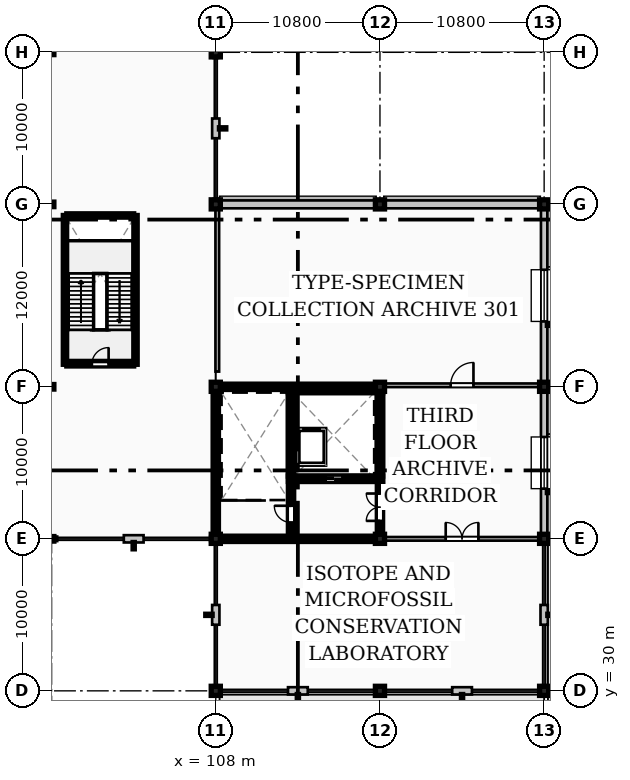
"""IFC4 building model, lengths in metres.
Left out: names, types, materials, properties, quantities, classifications, styles, units other than length and angle.
Written with IfcOpenShell. Run it as: python <this file> out.ifc"""

import sys

from ifc_helpers import new_model, si_unit, direction, frame, frame_2d, origin, origin_2d, place, context, subcontext, project, spatial, rectangle, hollow_rectangle, extrude, element, fill, save


model = new_model("IFC4")
c1 = context("Model", 3, precision=1e-05, world=origin(), true_north=direction((0.0, 1.0)))
c2 = subcontext(c1, "Body", "Model", "MODEL_VIEW")
j1 = project(units=[si_unit("LENGTHUNIT", "METRE"), si_unit("PLANEANGLEUNIT", "RADIAN")], contexts=[c1])
p1 = place(None, origin())
s1 = spatial("IfcSite", under=j1, at=p1, CompositionType="ELEMENT")
p2 = place(p1, origin())
s2 = spatial("IfcBuilding", under=s1, at=p2, CompositionType="ELEMENT")
p3 = place(p2, frame((0.0, 0.0, 14.4)))
s3 = spatial("IfcBuildingStorey", under=s2, at=p3, CompositionType="ELEMENT", Elevation=14.4)
for number, where, z_axis, x_axis in (
    (1, (97.2, 40.0, 0.0), (0.0, 0.0, 1.0), (1.0, 0.0, 0.0)),
    (2, (97.2, 50.0, 0.0), (0.0, 0.0, 1.0), (1.0, 0.0, 0.0)),
    (3, (97.2, 62.0, 0.0), (0.0, 0.0, 1.0), (1.0, 0.0, 0.0)),
    (4, (97.2, 72.0, 0.0), (0.0, 0.0, 1.0), (1.0, 0.0, 0.0)),
):
    element("IfcColumn", number, at=place(p3, frame(where, z_axis=z_axis, x_axis=x_axis)), inside=s3, PredefinedType="COLUMN", context=c2, shape_type="SweptSolid", body=[
        extrude(hollow_rectangle(XDim=0.3, YDim=0.3, WallThickness=0.016, InnerFilletRadius=0.016, OuterFilletRadius=0.032, at=origin_2d()), origin(), (0.0, 0.0, 1.0), 9.6),
    ])
for number, where, z_axis, x_axis in (
    (5, (108.0, 30.0, 0.0), (0.0, 0.0, 1.0), (1.0, 0.0, 0.0)),
    (6, (108.0, 40.0, 0.0), (0.0, 0.0, 1.0), (1.0, 0.0, 0.0)),
    (7, (108.0, 50.0, 0.0), (0.0, 0.0, 1.0), (1.0, 0.0, 0.0)),
    (8, (108.0, 62.0, 0.0), (0.0, 0.0, 1.0), (1.0, 0.0, 0.0)),
    (9, (108.0, 72.0, 0.0), (0.0, 0.0, 1.0), (1.0, 0.0, 0.0)),
    (10, (118.8, 30.0, 0.0), (0.0, 0.0, 1.0), (1.0, 0.0, 0.0)),
    (11, (118.8, 40.0, 0.0), (0.0, 0.0, 1.0), (1.0, 0.0, 0.0)),
    (12, (118.8, 50.0, 0.0), (0.0, 0.0, 1.0), (1.0, 0.0, 0.0)),
    (13, (118.8, 62.0, 0.0), (0.0, 0.0, 1.0), (1.0, 0.0, 0.0)),
    (14, (129.6, 30.0, 0.0), (0.0, 0.0, 1.0), (1.0, 0.0, 0.0)),
    (15, (129.6, 40.0, 0.0), (0.0, 0.0, 1.0), (1.0, 0.0, 0.0)),
    (16, (129.6, 50.0, 0.0), (0.0, 0.0, 1.0), (1.0, 0.0, 0.0)),
    (17, (129.6, 62.0, 0.0), (0.0, 0.0, 1.0), (1.0, 0.0, 0.0)),
):
    element("IfcColumn", number, at=place(p3, frame(where, z_axis=z_axis, x_axis=x_axis)), inside=s3, PredefinedType="COLUMN", context=c2, shape_type="SweptSolid", body=[
        extrude(rectangle(XDim=0.6, YDim=0.6, at=origin_2d()), origin(), (0.0, 0.0, 1.0), 9.6),
    ])
p4 = place(p3, frame((108.0, 35.65, 0.0), z_axis=(0.0, 0.0, 1.0), x_axis=(0.0, -1.0, 0.0)))
e18 = element("IfcWall", 18, at=p4, inside=s3, PredefinedType="STANDARD", context=c2, shape_type="SweptSolid", body=[
    extrude(rectangle(XDim=1.3, YDim=0.48, at=frame_2d((0.65, 0.0))), origin(), (0.0, 0.0, 1.0), 8.929),
])
for number, where, z_axis, x_axis in (
    (19, (108.0, 39.855, 0.0), (0.0, 0.0, 1.0), (0.0, -1.0, 0.0)),
    (20, (108.0, 30.37, 0.0), (0.0, 0.0, 1.0), (0.0, -1.0, 0.0)),
):
    element("IfcWall", number, at=place(p3, frame(where, z_axis=z_axis, x_axis=x_axis)), inside=s3, PredefinedType="STANDARD", context=c2, shape_type="SweptSolid", body=[
        extrude(rectangle(XDim=0.225, YDim=0.3, at=frame_2d((0.113, 0.0))), origin(), (0.0, 0.0, 1.0), 9.36),
    ])
p5 = place(p3, frame((112.75, 30.0, 0.0), z_axis=(0.0, 0.0, 1.0), x_axis=(1.0, 0.0, 0.0)))
e21 = element("IfcWall", 21, at=p5, inside=s3, PredefinedType="STANDARD", context=c2, shape_type="SweptSolid", body=[
    extrude(rectangle(XDim=1.3, YDim=0.48, at=frame_2d((0.65, 0.0))), origin(), (0.0, 0.0, 1.0), 8.929),
])
for number, where, z_axis, x_axis in (
    (22, (108.145, 30.0, 0.0), (0.0, 0.0, 1.0), (1.0, 0.0, 0.0)),
    (23, (118.43, 30.0, 0.0), (0.0, 0.0, 1.0), (1.0, 0.0, 0.0)),
):
    element("IfcWall", number, at=place(p3, frame(where, z_axis=z_axis, x_axis=x_axis)), inside=s3, PredefinedType="STANDARD", context=c2, shape_type="SweptSolid", body=[
        extrude(rectangle(XDim=0.225, YDim=0.3, at=frame_2d((0.113, 0.0))), origin(), (0.0, 0.0, 1.0), 9.36),
    ])
p6 = place(p3, frame((123.55, 30.0, 0.0), z_axis=(0.0, 0.0, 1.0), x_axis=(1.0, 0.0, 0.0)))
e24 = element("IfcWall", 24, at=p6, inside=s3, PredefinedType="STANDARD", context=c2, shape_type="SweptSolid", body=[
    extrude(rectangle(XDim=1.3, YDim=0.48, at=frame_2d((0.65, 0.0))), origin(), (0.0, 0.0, 1.0), 8.929),
])
p7 = place(p3, frame((118.945, 30.0, 0.0), z_axis=(0.0, 0.0, 1.0), x_axis=(1.0, 0.0, 0.0)))
e25 = element("IfcWall", 25, at=p7, inside=s3, PredefinedType="STANDARD", context=c2, shape_type="SweptSolid", body=[
    extrude(rectangle(XDim=0.225, YDim=0.3, at=frame_2d((0.112, 0.0))), origin(), (0.0, 0.0, 1.0), 9.36),
])
p8 = place(p3, frame((129.23, 30.0, 0.0), z_axis=(0.0, 0.0, 1.0), x_axis=(1.0, 0.0, 0.0)))
e26 = element("IfcWall", 26, at=p8, inside=s3, PredefinedType="STANDARD", context=c2, shape_type="SweptSolid", body=[
    extrude(rectangle(XDim=0.225, YDim=0.3, at=frame_2d((0.113, 0.0))), origin(), (0.0, 0.0, 1.0), 9.36),
])
p9 = place(p3, frame((129.6, 34.35, 0.0), z_axis=(0.0, 0.0, 1.0), x_axis=(0.0, 1.0, 0.0)))
e27 = element("IfcWall", 27, at=p9, inside=s3, PredefinedType="STANDARD", context=c2, shape_type="SweptSolid", body=[
    extrude(rectangle(XDim=1.3, YDim=0.48, at=frame_2d((0.65, 0.0))), origin(), (0.0, 0.0, 1.0), 8.929),
])
for number, where, z_axis, x_axis in (
    (28, (129.6, 30.145, 0.0), (0.0, 0.0, 1.0), (0.0, 1.0, 0.0)),
    (29, (129.6, 39.63, 0.0), (0.0, 0.0, 1.0), (0.0, 1.0, 0.0)),
):
    element("IfcWall", number, at=place(p3, frame(where, z_axis=z_axis, x_axis=x_axis)), inside=s3, PredefinedType="STANDARD", context=c2, shape_type="SweptSolid", body=[
        extrude(rectangle(XDim=0.225, YDim=0.3, at=frame_2d((0.113, 0.0))), origin(), (0.0, 0.0, 1.0), 9.36),
    ])
p10 = place(p3, frame((129.6, 40.145, 0.0), z_axis=(0.0, 0.0, 1.0), x_axis=(0.0, 1.0, 0.0)))
e30 = element("IfcWall", 30, at=p10, inside=s3, PredefinedType="STANDARD", context=c2, shape_type="SweptSolid", body=[
    extrude(rectangle(XDim=9.71, YDim=0.42, at=frame_2d((4.855, 0.0))), origin(), (0.0, 0.0, 1.0), 8.929),
])
p11 = place(p10, frame((3.155, 0.0, 1.1)))
e31 = element("IfcOpeningElement", 31, at=p11, cuts=e30, PredefinedType="OPENING", context=c2, shape_type="SweptSolid", body=[
    extrude(rectangle(XDim=3.4, YDim=5.8, at=frame_2d((1.7, 2.9))), frame((0.0, 0.22, 0.0), z_axis=(0.0, -1.0, 0.0), x_axis=(1.0, 0.0, 0.0)), (0.0, 0.0, 1.0), 0.44),
])
p12 = place(p3, frame((129.6, 50.145, 0.0), z_axis=(0.0, 0.0, 1.0), x_axis=(0.0, 1.0, 0.0)))
e32 = element("IfcWall", 32, at=p12, inside=s3, PredefinedType="STANDARD", context=c2, shape_type="SweptSolid", body=[
    extrude(rectangle(XDim=11.71, YDim=0.42, at=frame_2d((5.855, 0.0))), origin(), (0.0, 0.0, 1.0), 8.749),
])
p13 = place(p12, frame((4.155, 0.0, 1.1)))
e33 = element("IfcOpeningElement", 33, at=p13, cuts=e32, PredefinedType="OPENING", context=c2, shape_type="SweptSolid", body=[
    extrude(rectangle(XDim=3.4, YDim=5.8, at=frame_2d((1.7, 2.9))), frame((0.0, 0.22, 0.0), z_axis=(0.0, -1.0, 0.0), x_axis=(1.0, 0.0, 0.0)), (0.0, 0.0, 1.0), 0.44),
])
for number, where, z_axis, x_axis in (
    (34, (129.455, 62.0, 0.0), (0.0, 0.0, 1.0), (-1.0, 0.0, 0.0)),
    (35, (118.655, 62.0, 0.0), (0.0, 0.0, 1.0), (-1.0, 0.0, 0.0)),
):
    element("IfcWall", number, at=place(p3, frame(where, z_axis=z_axis, x_axis=x_axis)), inside=s3, PredefinedType="SOLIDWALL", context=c2, shape_type="SweptSolid", body=[
        extrude(rectangle(XDim=10.51, YDim=0.52, at=frame_2d((5.255, 0.0))), origin(), (0.0, 0.0, 1.0), 8.76),
    ])
p14 = place(p3, frame((108.0, 66.35, 0.0), z_axis=(0.0, 0.0, 1.0), x_axis=(0.0, 1.0, 0.0)))
e36 = element("IfcWall", 36, at=p14, inside=s3, PredefinedType="STANDARD", context=c2, shape_type="SweptSolid", body=[
    extrude(rectangle(XDim=1.3, YDim=0.48, at=frame_2d((0.65, 0.0))), origin(), (0.0, 0.0, 1.0), 9.36),
])
for number, where, z_axis, x_axis in (
    (37, (108.0, 62.145, 0.0), (0.0, 0.0, 1.0), (0.0, 1.0, 0.0)),
    (38, (108.0, 71.63, 0.0), (0.0, 0.0, 1.0), (0.0, 1.0, 0.0)),
):
    element("IfcWall", number, at=place(p3, frame(where, z_axis=z_axis, x_axis=x_axis)), inside=s3, PredefinedType="STANDARD", context=c2, shape_type="SweptSolid", body=[
        extrude(rectangle(XDim=0.225, YDim=0.3, at=frame_2d((0.113, 0.0))), origin(), (0.0, 0.0, 1.0), 9.36),
    ])
p15 = place(p3, frame((101.95, 40.0, 0.0), z_axis=(0.0, 0.0, 1.0), x_axis=(1.0, 0.0, 0.0)))
e39 = element("IfcWall", 39, at=p15, inside=s3, PredefinedType="STANDARD", context=c2, shape_type="SweptSolid", body=[
    extrude(rectangle(XDim=1.3, YDim=0.48, at=frame_2d((0.65, 0.0))), origin(), (0.0, 0.0, 1.0), 8.96),
])
for number, where, z_axis, x_axis in (
    (40, (97.345, 40.0, 0.0), (0.0, 0.0, 1.0), (1.0, 0.0, 0.0)),
    (41, (107.63, 40.0, 0.0), (0.0, 0.0, 1.0), (1.0, 0.0, 0.0)),
):
    element("IfcWall", number, at=place(p3, frame(where, z_axis=z_axis, x_axis=x_axis)), inside=s3, PredefinedType="STANDARD", context=c2, shape_type="SweptSolid", body=[
        extrude(rectangle(XDim=0.225, YDim=0.3, at=frame_2d((0.113, 0.0))), origin(), (0.0, 0.0, 1.0), 9.36),
    ])
for number, where, z_axis, x_axis in (
    (42, (108.3, 40.0, 0.0), (0.0, 0.0, 1.0), (1.0, 0.0, 0.0)),
    (43, (108.3, 50.0, 0.0), (0.0, 0.0, 1.0), (1.0, 0.0, 0.0)),
):
    element("IfcWall", number, at=place(p3, frame(where, z_axis=z_axis, x_axis=x_axis)), inside=s3, PredefinedType="SHEAR", context=c2, shape_type="SweptSolid", body=[
        extrude(rectangle(XDim=10.2, YDim=0.35, at=frame_2d((5.1, 0.0))), origin(), (0.0, 0.0, 1.0), 9.36),
    ])
p16 = place(p3, frame((108.0, 40.3, 0.0), z_axis=(0.0, 0.0, 1.0), x_axis=(0.0, 1.0, 0.0)))
e44 = element("IfcWall", 44, at=p16, inside=s3, PredefinedType="SHEAR", context=c2, shape_type="SweptSolid", body=[
    extrude(rectangle(XDim=9.4, YDim=0.35, at=frame_2d((4.7, 0.0))), origin(), (0.0, 0.0, 1.0), 9.36),
])
p17 = place(p3, frame((118.8, 40.3, 0.0), z_axis=(0.0, 0.0, 1.0), x_axis=(0.0, 1.0, 0.0)))
e45 = element("IfcWall", 45, at=p17, inside=s3, PredefinedType="SHEAR", context=c2, shape_type="SweptSolid", body=[
    extrude(rectangle(XDim=9.4, YDim=0.35, at=frame_2d((4.7, 0.0))), origin(), (0.0, 0.0, 1.0), 9.36),
])
p18 = place(p17, frame((0.88, 0.0, 0.0)))
e46 = element("IfcOpeningElement", 46, at=p18, cuts=e45, PredefinedType="OPENING", context=c2, shape_type="SweptSolid", body=[
    extrude(rectangle(XDim=1.8, YDim=2.25, at=frame_2d((0.9, 1.125))), frame((0.0, 0.185, 0.0), z_axis=(0.0, -1.0, 0.0), x_axis=(1.0, 0.0, 0.0)), (0.0, 0.0, 1.0), 0.37),
])
p19 = place(p3, frame((112.95, 40.175, 0.0), z_axis=(0.0, 0.0, 1.0), x_axis=(0.0, 1.0, 0.0)))
e47 = element("IfcWall", 47, at=p19, inside=s3, PredefinedType="SHEAR", context=c2, shape_type="SweptSolid", body=[
    extrude(rectangle(XDim=9.65, YDim=0.35, at=frame_2d((4.825, 0.0))), origin(), (0.0, 0.0, 1.0), 9.36),
])
p20 = place(p19, frame((0.9, 0.0, 0.0)))
e48 = element("IfcOpeningElement", 48, at=p20, cuts=e47, PredefinedType="OPENING", context=c2, shape_type="SweptSolid", body=[
    extrude(rectangle(XDim=1.1, YDim=2.2, at=frame_2d((0.55, 1.1))), frame((0.0, 0.185, 0.0), z_axis=(0.0, -1.0, 0.0), x_axis=(1.0, 0.0, 0.0)), (0.0, 0.0, 1.0), 0.37),
])
p21 = place(p3, frame((113.13, 43.95, 0.0), z_axis=(0.0, 0.0, 1.0), x_axis=(1.0, 0.0, 0.0)))
e49 = element("IfcWall", 49, at=p21, inside=s3, PredefinedType="SHEAR", context=c2, shape_type="SweptSolid", body=[
    extrude(rectangle(XDim=5.49, YDim=0.35, at=frame_2d((2.745, 0.0))), origin(), (0.0, 0.0, 1.0), 9.36),
])
p22 = place(p21, frame((2.1, 0.0, 0.0)))
e50 = element("IfcOpeningElement", 50, at=p22, cuts=e49, PredefinedType="OPENING", context=c2, shape_type="SweptSolid", body=[
    extrude(rectangle(XDim=1.1, YDim=2.2, at=frame_2d((0.55, 1.1))), frame((0.0, 0.185, 0.0), z_axis=(0.0, -1.0, 0.0), x_axis=(1.0, 0.0, 0.0)), (0.0, 0.0, 1.0), 0.37),
])
for number, where, z_axis, x_axis in (
    (51, (112.775, 43.95, 9.36), (0.0, 0.0, 1.0), (1.0, 0.0, 0.0)),
    (52, (112.775, 49.78, 9.36), (0.0, 0.0, 1.0), (1.0, 0.0, 0.0)),
):
    element("IfcWall", number, at=place(p3, frame(where, z_axis=z_axis, x_axis=x_axis)), inside=s3, PredefinedType="SHEAR", context=c2, shape_type="SweptSolid", body=[
        extrude(rectangle(XDim=6.2, YDim=0.35, at=frame_2d((3.1, 0.0))), origin(), (0.0, 0.0, 1.0), 1.64),
    ])
for number, where, z_axis, x_axis in (
    (53, (112.95, 44.125, 9.36), (0.0, 0.0, 1.0), (0.0, 1.0, 0.0)),
    (54, (118.8, 44.125, 9.36), (0.0, 0.0, 1.0), (0.0, 1.0, 0.0)),
):
    element("IfcWall", number, at=place(p3, frame(where, z_axis=z_axis, x_axis=x_axis)), inside=s3, PredefinedType="SHEAR", context=c2, shape_type="SweptSolid", body=[
        extrude(rectangle(XDim=5.48, YDim=0.35, at=frame_2d((2.74, 0.0))), origin(), (0.0, 0.0, 1.0), 1.64),
    ])
for number, where, z_axis, x_axis in (
    (55, (98.08, 51.48, 0.0), (0.0, 0.0, 1.0), (0.0, 1.0, 0.0)),
    (56, (102.72, 51.48, 0.0), (0.0, 0.0, 1.0), (0.0, 1.0, 0.0)),
):
    element("IfcWall", number, at=place(p3, frame(where, z_axis=z_axis, x_axis=x_axis)), inside=s3, PredefinedType="SHEAR", context=c2, shape_type="SweptSolid", body=[
        extrude(rectangle(XDim=9.79, YDim=0.22, at=frame_2d((4.895, 0.0))), origin(), (0.0, 0.0, 1.0), 9.36),
    ])
p23 = place(p3, frame((98.2, 61.27, 0.0), z_axis=(0.0, 0.0, 1.0), x_axis=(1.0, 0.0, 0.0)))
e57 = element("IfcWall", 57, at=p23, inside=s3, PredefinedType="SHEAR", context=c2, shape_type="SweptSolid", body=[
    extrude(rectangle(XDim=4.4, YDim=0.22, at=frame_2d((2.2, 0.0))), origin(), (0.0, 0.0, 1.0), 9.36),
])
p24 = place(p3, frame((98.2, 51.48, 0.0), z_axis=(0.0, 0.0, 1.0), x_axis=(1.0, 0.0, 0.0)))
e58 = element("IfcWall", 58, at=p24, inside=s3, PredefinedType="SHEAR", context=c2, shape_type="SweptSolid", body=[
    extrude(rectangle(XDim=4.4, YDim=0.22, at=frame_2d((2.2, 0.0))), origin(), (0.0, 0.0, 1.0), 9.36),
])
p25 = place(p24, frame((1.65, 0.0, 0.0)))
e59 = element("IfcOpeningElement", 59, at=p25, cuts=e58, PredefinedType="OPENING", context=c2, shape_type="SweptSolid", body=[
    extrude(rectangle(XDim=1.1, YDim=2.2, at=frame_2d((0.55, 1.1))), frame((0.0, 0.12, 0.0), z_axis=(0.0, -1.0, 0.0), x_axis=(1.0, 0.0, 0.0)), (0.0, 0.0, 1.0), 0.24),
])
p26 = place(p3, frame((118.98, 40.0, 0.0), z_axis=(0.0, 0.0, 1.0), x_axis=(1.0, 0.0, 0.0)))
e60 = element("IfcWall", 60, at=p26, inside=s3, PredefinedType="SOLIDWALL", context=c2, shape_type="SweptSolid", body=[
    extrude(rectangle(XDim=10.44, YDim=0.24, at=frame_2d((5.22, 0.0))), origin(), (0.0, 0.0, 1.0), 8.929),
])
p27 = place(p26, frame((4.145, 0.0, 0.0)))
e61 = element("IfcOpeningElement", 61, at=p27, cuts=e60, PredefinedType="OPENING", context=c2, shape_type="SweptSolid", body=[
    extrude(rectangle(XDim=2.15, YDim=2.6, at=frame_2d((1.075, 1.3))), frame((0.0, 0.13, 0.0), z_axis=(0.0, -1.0, 0.0), x_axis=(1.0, 0.0, 0.0)), (0.0, 0.0, 1.0), 0.26),
])
p28 = place(p3, frame((118.98, 50.1, 0.0), z_axis=(0.0, 0.0, 1.0), x_axis=(1.0, 0.0, 0.0)))
e62 = element("IfcWall", 62, at=p28, inside=s3, PredefinedType="SOLIDWALL", context=c2, shape_type="SweptSolid", body=[
    extrude(rectangle(XDim=10.44, YDim=0.24, at=frame_2d((5.22, 0.0))), origin(), (0.0, 0.0, 1.0), 8.76),
])
p29 = place(p28, frame((4.47, 0.0, 0.0)))
e63 = element("IfcOpeningElement", 63, at=p29, cuts=e62, PredefinedType="OPENING", context=c2, shape_type="SweptSolid", body=[
    extrude(rectangle(XDim=1.5, YDim=2.4, at=frame_2d((0.75, 1.2))), frame((0.0, 0.13, 0.0), z_axis=(0.0, -1.0, 0.0), x_axis=(1.0, 0.0, 0.0)), (0.0, 0.0, 1.0), 0.26),
])
p30 = place(p3, frame((108.1, 51.0, 0.0), z_axis=(0.0, 0.0, 1.0), x_axis=(0.0, 1.0, 0.0)))
e64 = element("IfcWall", 64, at=p30, inside=s3, PredefinedType="SOLIDWALL", context=c2, shape_type="SweptSolid", body=[
    extrude(rectangle(XDim=10.82, YDim=0.24, at=frame_2d((5.41, 0.0))), origin(), (0.0, 0.0, 1.0), 8.749),
])
p31 = place(p11, origin())
e65 = element("IfcWindow", 65, at=p31, inside=s3, PartitioningType="SINGLE_PANEL", PredefinedType="WINDOW", context=c2, shape_type="SweptSolid", body=[
    extrude(rectangle(XDim=3.4, YDim=5.8, at=frame_2d((1.7, 2.9))), frame((0.0, 0.03, 0.0), z_axis=(0.0, -1.0, 0.0), x_axis=(1.0, 0.0, 0.0)), (0.0, 0.0, 1.0), 0.06),
])
fill(e31, e65)
p32 = place(p13, origin())
e66 = element("IfcWindow", 66, at=p32, inside=s3, PartitioningType="SINGLE_PANEL", PredefinedType="WINDOW", context=c2, shape_type="SweptSolid", body=[
    extrude(rectangle(XDim=3.4, YDim=5.8, at=frame_2d((1.7, 2.9))), frame((0.0, 0.03, 0.0), z_axis=(0.0, -1.0, 0.0), x_axis=(1.0, 0.0, 0.0)), (0.0, 0.0, 1.0), 0.06),
])
fill(e33, e66)
p33 = place(p20, origin())
e67 = element("IfcDoor", 67, at=p33, inside=s3, OperationType="SINGLE_SWING_RIGHT", PredefinedType="DOOR", context=c2, shape_type="SweptSolid", body=[
    extrude(rectangle(XDim=1.1, YDim=2.2, at=frame_2d((0.55, 1.1))), frame((0.0, 0.025, 0.0), z_axis=(0.0, -1.0, 0.0), x_axis=(1.0, 0.0, 0.0)), (0.0, 0.0, 1.0), 0.05),
])
fill(e48, e67)
p34 = place(p18, origin())
e68 = element("IfcDoor", 68, at=p34, inside=s3, OperationType="DOUBLE_DOOR_SINGLE_SWING", PredefinedType="DOOR", context=c2, shape_type="SweptSolid", body=[
    extrude(rectangle(XDim=1.8, YDim=2.25, at=frame_2d((0.9, 1.125))), frame((0.0, 0.025, 0.0), z_axis=(0.0, -1.0, 0.0), x_axis=(1.0, 0.0, 0.0)), (0.0, 0.0, 1.0), 0.05),
])
fill(e46, e68)
p35 = place(p22, origin())
e69 = element("IfcDoor", 69, at=p35, inside=s3, OperationType="DOUBLE_DOOR_SLIDING", PredefinedType="DOOR", context=c2, shape_type="SweptSolid", body=[
    extrude(rectangle(XDim=1.1, YDim=2.2, at=frame_2d((0.55, 1.1))), frame((0.0, 0.025, 0.0), z_axis=(0.0, -1.0, 0.0), x_axis=(1.0, 0.0, 0.0)), (0.0, 0.0, 1.0), 0.05),
])
fill(e50, e69)
p36 = place(p25, origin())
e70 = element("IfcDoor", 70, at=p36, inside=s3, OperationType="SINGLE_SWING_RIGHT", PredefinedType="DOOR", context=c2, shape_type="SweptSolid", body=[
    extrude(rectangle(XDim=1.1, YDim=2.2, at=frame_2d((0.55, 1.1))), frame((0.0, 0.025, 0.0), z_axis=(0.0, -1.0, 0.0), x_axis=(1.0, 0.0, 0.0)), (0.0, 0.0, 1.0), 0.05),
])
fill(e59, e70)
p37 = place(p27, origin())
e71 = element("IfcDoor", 71, at=p37, inside=s3, OperationType="DOUBLE_DOOR_SINGLE_SWING", PredefinedType="DOOR", context=c2, shape_type="SweptSolid", body=[
    extrude(rectangle(XDim=2.15, YDim=2.6, at=frame_2d((1.075, 1.3))), frame((0.0, 0.025, 0.0), z_axis=(0.0, -1.0, 0.0), x_axis=(1.0, 0.0, 0.0)), (0.0, 0.0, 1.0), 0.05),
])
fill(e61, e71)
p38 = place(p29, origin())
e72 = element("IfcDoor", 72, at=p38, inside=s3, OperationType="SINGLE_SWING_RIGHT", PredefinedType="DOOR", context=c2, shape_type="SweptSolid", body=[
    extrude(rectangle(XDim=1.5, YDim=2.4, at=frame_2d((0.75, 1.2))), frame((0.0, 0.025, 0.0), z_axis=(0.0, -1.0, 0.0), x_axis=(1.0, 0.0, 0.0)), (0.0, 0.0, 1.0), 0.05),
])
fill(e63, e72)
save(model, sys.argv[1])
